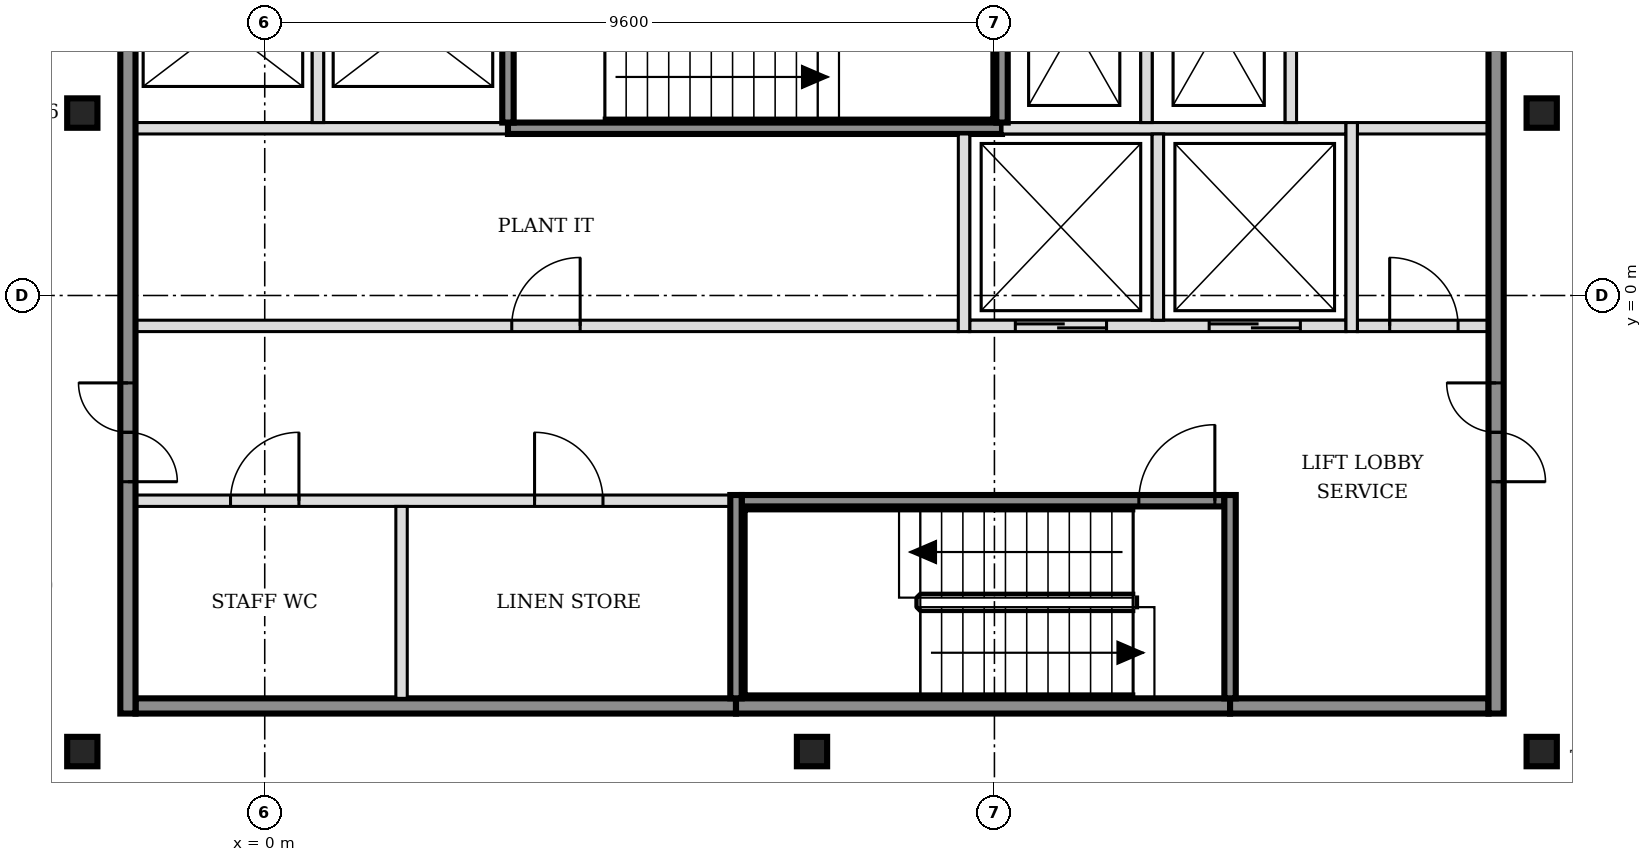
"""IFC4 building model, lengths in metres.
Left out: names, types, materials, properties, quantities, classifications, styles, units other than length and angle.
Written with IfcOpenShell. Run it as: python <this file> out.ifc"""

import sys

from ifc_helpers import new_model, si_unit, direction, frame, frame_2d, origin, origin_2d, place, context, subcontext, project, spatial, rectangle, i_section, extrude, element, fill, save


model = new_model("IFC4")
c1 = context("Model", 3, precision=1e-05, world=origin(), true_north=direction((0.0, 1.0)))
c2 = subcontext(c1, "Body", "Model", "MODEL_VIEW")
j1 = project(units=[si_unit("LENGTHUNIT", "METRE"), si_unit("PLANEANGLEUNIT", "RADIAN")], contexts=[c1])
p1 = place(None, origin())
s1 = spatial("IfcSite", under=j1, at=p1, CompositionType="ELEMENT")
p2 = place(p1, origin())
s2 = spatial("IfcBuilding", under=s1, at=p2, CompositionType="ELEMENT")
p3 = place(p2, frame((0.0, 0.0, 277.8)))
s3 = spatial("IfcBuildingStorey", under=s2, at=p3, CompositionType="ELEMENT", Elevation=277.8)
for number, where, z_axis, x_axis in (
    (1, (-2.4, -6.0, -0.15), (0.0, 0.0, 1.0), (1.0, 0.0, 0.0)),
    (2, (7.2, -6.0, -0.15), (0.0, 0.0, 1.0), (1.0, 0.0, 0.0)),
    (3, (16.8, -6.0, -0.15), (0.0, 0.0, 1.0), (1.0, 0.0, 0.0)),
    (4, (-2.4, 2.4, -0.15), (0.0, 0.0, 1.0), (1.0, 0.0, 0.0)),
    (5, (16.8, 2.4, -0.15), (0.0, 0.0, 1.0), (1.0, 0.0, 0.0)),
):
    element("IfcColumn", number, at=place(p3, frame(where, z_axis=z_axis, x_axis=x_axis)), inside=s3, PredefinedType="COLUMN", context=c2, shape_type="SweptSolid", body=[
        extrude(i_section(OverallWidth=0.398, OverallDepth=0.387, WebThickness=0.021, FlangeThickness=0.033, FilletRadius=0.015, at=origin_2d()), origin(), (0.0, 0.0, 1.0), 3.6),
    ])
p4 = place(p3, frame((-1.7, -5.4, 0.0), z_axis=(0.0, 0.0, 1.0), x_axis=(1.0, 0.0, 0.0)))
e6 = element("IfcWall", 6, at=p4, inside=s3, PredefinedType="SOLIDWALL", context=c2, shape_type="SweptSolid", body=[
    extrude(rectangle(XDim=7.9, YDim=0.2, at=frame_2d((3.95, 0.0))), origin(), (0.0, 0.0, 1.0), 3.45),
])
p5 = place(p3, frame((6.2, -5.4, 0.0), z_axis=(0.0, 0.0, 1.0), x_axis=(1.0, 0.0, 0.0)))
e7 = element("IfcWall", 7, at=p5, inside=s3, PredefinedType="SOLIDWALL", context=c2, shape_type="SweptSolid", body=[
    extrude(rectangle(XDim=6.5, YDim=0.2, at=frame_2d((3.25, 0.0))), origin(), (0.0, 0.0, 1.0), 3.45),
])
p6 = place(p3, frame((12.7, -5.4, 0.0), z_axis=(0.0, 0.0, 1.0), x_axis=(1.0, 0.0, 0.0)))
e8 = element("IfcWall", 8, at=p6, inside=s3, PredefinedType="SOLIDWALL", context=c2, shape_type="SweptSolid", body=[
    extrude(rectangle(XDim=3.4, YDim=0.2, at=frame_2d((1.7, 0.0))), origin(), (0.0, 0.0, 1.0), 3.45),
])
p7 = place(p3, frame((-1.7, -2.7, 0.0), z_axis=(0.0, 0.0, 1.0), x_axis=(1.0, 0.0, 0.0)))
e9 = element("IfcWall", 9, at=p7, inside=s3, PredefinedType="PARTITIONING", context=c2, shape_type="SweptSolid", body=[
    extrude(rectangle(XDim=7.825, YDim=0.15, at=frame_2d((3.913, 0.0))), origin(), (0.0, 0.0, 1.0), 3.45),
])
p8 = place(p7, frame((1.25, 0.0, 0.0)))
e10 = element("IfcOpeningElement", 10, at=p8, cuts=e9, PredefinedType="OPENING", context=c2, shape_type="SweptSolid", body=[
    extrude(rectangle(XDim=0.9, YDim=2.1, at=frame_2d((0.45, 1.05))), frame((0.0, 0.085, 0.0), z_axis=(0.0, -1.0, 0.0), x_axis=(1.0, 0.0, 0.0)), (0.0, 0.0, 1.0), 0.17),
])
p9 = place(p7, frame((5.25, 0.0, 0.0)))
e11 = element("IfcOpeningElement", 11, at=p9, cuts=e9, PredefinedType="OPENING", context=c2, shape_type="SweptSolid", body=[
    extrude(rectangle(XDim=0.9, YDim=2.1, at=frame_2d((0.45, 1.05))), frame((0.0, 0.085, 0.0), z_axis=(0.0, -1.0, 0.0), x_axis=(1.0, 0.0, 0.0)), (0.0, 0.0, 1.0), 0.17),
])
p10 = place(p3, frame((6.275, -2.7, 0.0), z_axis=(0.0, 0.0, 1.0), x_axis=(1.0, 0.0, 0.0)))
e12 = element("IfcWall", 12, at=p10, inside=s3, PredefinedType="SOLIDWALL", context=c2, shape_type="SweptSolid", body=[
    extrude(rectangle(XDim=6.35, YDim=0.15, at=frame_2d((3.175, 0.0))), origin(), (0.0, 0.0, 1.0), 3.45),
])
p11 = place(p10, frame((5.225, 0.0, 0.0)))
e13 = element("IfcOpeningElement", 13, at=p11, cuts=e12, PredefinedType="OPENING", context=c2, shape_type="SweptSolid", body=[
    extrude(rectangle(XDim=1.0, YDim=2.1, at=frame_2d((0.5, 1.05))), frame((0.0, 0.085, 0.0), z_axis=(0.0, -1.0, 0.0), x_axis=(1.0, 0.0, 0.0)), (0.0, 0.0, 1.0), 0.17),
])
p12 = place(p3, frame((-1.7, -0.4, 0.0), z_axis=(0.0, 0.0, 1.0), x_axis=(1.0, 0.0, 0.0)))
e14 = element("IfcWall", 14, at=p12, inside=s3, PredefinedType="PARTITIONING", context=c2, shape_type="SweptSolid", body=[
    extrude(rectangle(XDim=10.825, YDim=0.15, at=frame_2d((5.413, 0.0))), origin(), (0.0, 0.0, 1.0), 3.45),
])
p13 = place(p12, frame((4.95, 0.0, 0.0)))
e15 = element("IfcOpeningElement", 15, at=p13, cuts=e14, PredefinedType="OPENING", context=c2, shape_type="SweptSolid", body=[
    extrude(rectangle(XDim=0.9, YDim=2.1, at=frame_2d((0.45, 1.05))), frame((0.0, 0.085, 0.0), z_axis=(0.0, -1.0, 0.0), x_axis=(1.0, 0.0, 0.0)), (0.0, 0.0, 1.0), 0.17),
])
p14 = place(p3, frame((9.275, -0.4, 0.0), z_axis=(0.0, 0.0, 1.0), x_axis=(1.0, 0.0, 0.0)))
e16 = element("IfcWall", 16, at=p14, inside=s3, PredefinedType="SOLIDWALL", context=c2, shape_type="SweptSolid", body=[
    extrude(rectangle(XDim=4.95, YDim=0.15, at=frame_2d((2.475, 0.0))), origin(), (0.0, 0.0, 1.0), 3.45),
])
p15 = place(p14, frame((0.6, 0.0, 0.0)))
e17 = element("IfcOpeningElement", 17, at=p15, cuts=e16, PredefinedType="OPENING", context=c2, shape_type="SweptSolid", body=[
    extrude(rectangle(XDim=1.2, YDim=2.1, at=frame_2d((0.6, 1.05))), frame((0.0, 0.085, 0.0), z_axis=(0.0, -1.0, 0.0), x_axis=(1.0, 0.0, 0.0)), (0.0, 0.0, 1.0), 0.17),
])
p16 = place(p14, frame((3.15, 0.0, 0.0)))
e18 = element("IfcOpeningElement", 18, at=p16, cuts=e16, PredefinedType="OPENING", context=c2, shape_type="SweptSolid", body=[
    extrude(rectangle(XDim=1.2, YDim=2.1, at=frame_2d((0.6, 1.05))), frame((0.0, 0.085, 0.0), z_axis=(0.0, -1.0, 0.0), x_axis=(1.0, 0.0, 0.0)), (0.0, 0.0, 1.0), 0.17),
])
p17 = place(p3, frame((14.375, -0.4, 0.0), z_axis=(0.0, 0.0, 1.0), x_axis=(1.0, 0.0, 0.0)))
e19 = element("IfcWall", 19, at=p17, inside=s3, PredefinedType="PARTITIONING", context=c2, shape_type="SweptSolid", body=[
    extrude(rectangle(XDim=1.725, YDim=0.15, at=frame_2d((0.863, 0.0))), origin(), (0.0, 0.0, 1.0), 3.45),
])
p18 = place(p17, frame((0.425, 0.0, 0.0)))
e20 = element("IfcOpeningElement", 20, at=p18, cuts=e19, PredefinedType="OPENING", context=c2, shape_type="SweptSolid", body=[
    extrude(rectangle(XDim=0.9, YDim=2.1, at=frame_2d((0.45, 1.05))), frame((0.0, 0.085, 0.0), z_axis=(0.0, -1.0, 0.0), x_axis=(1.0, 0.0, 0.0)), (0.0, 0.0, 1.0), 0.17),
])
p19 = place(p3, frame((-1.7, 2.2, 0.0), z_axis=(0.0, 0.0, 1.0), x_axis=(1.0, 0.0, 0.0)))
e21 = element("IfcWall", 21, at=p19, inside=s3, PredefinedType="SOLIDWALL", context=c2, shape_type="SweptSolid", body=[
    extrude(rectangle(XDim=4.9, YDim=0.15, at=frame_2d((2.45, 0.0))), origin(), (0.0, 0.0, 1.0), 3.45),
])
p20 = place(p3, frame((3.2, 2.2, 0.0), z_axis=(0.0, 0.0, 1.0), x_axis=(1.0, 0.0, 0.0)))
e22 = element("IfcWall", 22, at=p20, inside=s3, PredefinedType="SOLIDWALL", context=c2, shape_type="SweptSolid", body=[
    extrude(rectangle(XDim=6.5, YDim=0.15, at=frame_2d((3.25, 0.0))), origin(), (0.0, 0.0, 1.0), 3.45),
])
p21 = place(p3, frame((9.7, 2.2, 0.0), z_axis=(0.0, 0.0, 1.0), x_axis=(1.0, 0.0, 0.0)))
e23 = element("IfcWall", 23, at=p21, inside=s3, PredefinedType="SOLIDWALL", context=c2, shape_type="SweptSolid", body=[
    extrude(rectangle(XDim=4.525, YDim=0.15, at=frame_2d((2.263, 0.0))), origin(), (0.0, 0.0, 1.0), 3.45),
])
p22 = place(p3, frame((14.375, 2.2, 0.0), z_axis=(0.0, 0.0, 1.0), x_axis=(1.0, 0.0, 0.0)))
e24 = element("IfcWall", 24, at=p22, inside=s3, PredefinedType="PARTITIONING", context=c2, shape_type="SweptSolid", body=[
    extrude(rectangle(XDim=1.725, YDim=0.15, at=frame_2d((0.863, 0.0))), origin(), (0.0, 0.0, 1.0), 3.45),
])
p23 = place(p3, frame((-1.8, -5.5, 0.0), z_axis=(0.0, 0.0, 1.0), x_axis=(0.0, 1.0, 0.0)))
e25 = element("IfcWall", 25, at=p23, inside=s3, PredefinedType="SOLIDWALL", context=c2, shape_type="SweptSolid", body=[
    extrude(rectangle(XDim=15.8, YDim=0.2, at=frame_2d((7.9, 0.0))), origin(), (0.0, 0.0, 1.0), 3.45),
])
p24 = place(p23, frame((3.05, 0.0, 0.0)))
e26 = element("IfcOpeningElement", 26, at=p24, cuts=e25, PredefinedType="OPENING", context=c2, shape_type="SweptSolid", body=[
    extrude(rectangle(XDim=1.3, YDim=2.1, at=frame_2d((0.65, 1.05))), frame((0.0, 0.11, 0.0), z_axis=(0.0, -1.0, 0.0), x_axis=(1.0, 0.0, 0.0)), (0.0, 0.0, 1.0), 0.22),
])
p25 = place(p23, frame((11.45, 0.0, 0.0)))
e27 = element("IfcOpeningElement", 27, at=p25, cuts=e25, PredefinedType="OPENING", context=c2, shape_type="SweptSolid", body=[
    extrude(rectangle(XDim=1.3, YDim=2.1, at=frame_2d((0.65, 1.05))), frame((0.0, 0.11, 0.0), z_axis=(0.0, -1.0, 0.0), x_axis=(1.0, 0.0, 0.0)), (0.0, 0.0, 1.0), 0.22),
])
p26 = place(p3, frame((0.7, 2.275, 0.0), z_axis=(0.0, 0.0, 1.0), x_axis=(0.0, 1.0, 0.0)))
e28 = element("IfcWall", 28, at=p26, inside=s3, PredefinedType="SOLIDWALL", context=c2, shape_type="SweptSolid", body=[
    extrude(rectangle(XDim=2.55, YDim=0.15, at=frame_2d((1.275, 0.0))), origin(), (0.0, 0.0, 1.0), 3.45),
])
p27 = place(p3, frame((1.8, -5.3, 0.0), z_axis=(0.0, 0.0, 1.0), x_axis=(0.0, 1.0, 0.0)))
e29 = element("IfcWall", 29, at=p27, inside=s3, PredefinedType="PARTITIONING", context=c2, shape_type="SweptSolid", body=[
    extrude(rectangle(XDim=2.525, YDim=0.15, at=frame_2d((1.263, 0.0))), origin(), (0.0, 0.0, 1.0), 3.45),
])
p28 = place(p3, frame((3.2, 2.275, 0.0), z_axis=(0.0, 0.0, 1.0), x_axis=(0.0, 1.0, 0.0)))
e30 = element("IfcWall", 30, at=p28, inside=s3, PredefinedType="SOLIDWALL", context=c2, shape_type="SweptSolid", body=[
    extrude(rectangle(XDim=2.55, YDim=0.15, at=frame_2d((1.275, 0.0))), origin(), (0.0, 0.0, 1.0), 3.45),
])
p29 = place(p3, frame((6.2, -5.3, 0.0), z_axis=(0.0, 0.0, 1.0), x_axis=(0.0, 1.0, 0.0)))
e31 = element("IfcWall", 31, at=p29, inside=s3, PredefinedType="SOLIDWALL", context=c2, shape_type="SweptSolid", body=[
    extrude(rectangle(XDim=2.675, YDim=0.15, at=frame_2d((1.337, 0.0))), origin(), (0.0, 0.0, 1.0), 3.45),
])
p30 = place(p3, frame((9.2, -0.475, 0.0), z_axis=(0.0, 0.0, 1.0), x_axis=(0.0, 1.0, 0.0)))
e32 = element("IfcWall", 32, at=p30, inside=s3, PredefinedType="SOLIDWALL", context=c2, shape_type="SweptSolid", body=[
    extrude(rectangle(XDim=2.6, YDim=0.15, at=frame_2d((1.3, 0.0))), origin(), (0.0, 0.0, 1.0), 3.45),
])
for number, where, z_axis, x_axis in (
    (33, (9.7, 2.275, 0.0), (0.0, 0.0, 1.0), (0.0, 1.0, 0.0)),
    (34, (11.6, 2.275, 0.0), (0.0, 0.0, 1.0), (0.0, 1.0, 0.0)),
):
    element("IfcWall", number, at=place(p3, frame(where, z_axis=z_axis, x_axis=x_axis)), inside=s3, PredefinedType="SOLIDWALL", context=c2, shape_type="SweptSolid", body=[
        extrude(rectangle(XDim=2.55, YDim=0.15, at=frame_2d((1.275, 0.0))), origin(), (0.0, 0.0, 1.0), 3.45),
    ])
p31 = place(p3, frame((11.75, -0.325, 0.0), z_axis=(0.0, 0.0, 1.0), x_axis=(0.0, 1.0, 0.0)))
e35 = element("IfcWall", 35, at=p31, inside=s3, PredefinedType="SOLIDWALL", context=c2, shape_type="SweptSolid", body=[
    extrude(rectangle(XDim=2.45, YDim=0.15, at=frame_2d((1.225, 0.0))), origin(), (0.0, 0.0, 1.0), 3.45),
])
p32 = place(p3, frame((12.7, -5.3, 0.0), z_axis=(0.0, 0.0, 1.0), x_axis=(0.0, 1.0, 0.0)))
e36 = element("IfcWall", 36, at=p32, inside=s3, PredefinedType="SOLIDWALL", context=c2, shape_type="SweptSolid", body=[
    extrude(rectangle(XDim=2.675, YDim=0.15, at=frame_2d((1.337, 0.0))), origin(), (0.0, 0.0, 1.0), 3.45),
])
p33 = place(p3, frame((13.5, 2.275, 0.0), z_axis=(0.0, 0.0, 1.0), x_axis=(0.0, 1.0, 0.0)))
e37 = element("IfcWall", 37, at=p33, inside=s3, PredefinedType="SOLIDWALL", context=c2, shape_type="SweptSolid", body=[
    extrude(rectangle(XDim=2.55, YDim=0.15, at=frame_2d((1.275, 0.0))), origin(), (0.0, 0.0, 1.0), 3.45),
])
p34 = place(p3, frame((14.3, -0.475, 0.0), z_axis=(0.0, 0.0, 1.0), x_axis=(0.0, 1.0, 0.0)))
e38 = element("IfcWall", 38, at=p34, inside=s3, PredefinedType="SOLIDWALL", context=c2, shape_type="SweptSolid", body=[
    extrude(rectangle(XDim=2.75, YDim=0.15, at=frame_2d((1.375, 0.0))), origin(), (0.0, 0.0, 1.0), 3.45),
])
p35 = place(p3, frame((16.2, -5.5, 0.0), z_axis=(0.0, 0.0, 1.0), x_axis=(0.0, 1.0, 0.0)))
e39 = element("IfcWall", 39, at=p35, inside=s3, PredefinedType="SOLIDWALL", context=c2, shape_type="SweptSolid", body=[
    extrude(rectangle(XDim=15.8, YDim=0.2, at=frame_2d((7.9, 0.0))), origin(), (0.0, 0.0, 1.0), 3.45),
])
p36 = place(p35, frame((3.05, 0.0, 0.0)))
e40 = element("IfcOpeningElement", 40, at=p36, cuts=e39, PredefinedType="OPENING", context=c2, shape_type="SweptSolid", body=[
    extrude(rectangle(XDim=1.3, YDim=2.1, at=frame_2d((0.65, 1.05))), frame((0.0, 0.11, 0.0), z_axis=(0.0, -1.0, 0.0), x_axis=(1.0, 0.0, 0.0)), (0.0, 0.0, 1.0), 0.22),
])
p37 = place(p35, frame((11.45, 0.0, 0.0)))
e41 = element("IfcOpeningElement", 41, at=p37, cuts=e39, PredefinedType="OPENING", context=c2, shape_type="SweptSolid", body=[
    extrude(rectangle(XDim=1.3, YDim=2.1, at=frame_2d((0.65, 1.05))), frame((0.0, 0.11, 0.0), z_axis=(0.0, -1.0, 0.0), x_axis=(1.0, 0.0, 0.0)), (0.0, 0.0, 1.0), 0.22),
])
p38 = place(p3, frame((13.122, -17.872, 0.0), z_axis=(0.0, 0.0, 1.0), x_axis=(0.707101927234, 0.707111635106, 0.0)))
e42 = element("IfcWall", 42, at=p38, inside=s3, PredefinedType="PARTITIONING", context=c2, shape_type="SweptSolid", body=[
    extrude(rectangle(XDim=25.149, YDim=0.15, at=frame_2d((12.574, 0.0))), origin(), (0.0, 0.0, 1.0), 2.73),
])
p39 = place(p38, frame((4.672, 0.0, 0.0)))
e43 = element("IfcOpeningElement", 43, at=p39, cuts=e42, PredefinedType="OPENING", context=c2, shape_type="SweptSolid", body=[
    extrude(rectangle(XDim=0.9, YDim=2.1, at=frame_2d((0.45, 1.05))), frame((0.0, 0.085, 0.0), z_axis=(0.0, -1.0, 0.0), x_axis=(1.0, 0.0, 0.0)), (0.0, 0.0, 1.0), 0.17),
])
p40 = place(p38, frame((14.284, 0.0, 0.0)))
e44 = element("IfcOpeningElement", 44, at=p40, cuts=e42, PredefinedType="OPENING", context=c2, shape_type="SweptSolid", body=[
    extrude(rectangle(XDim=0.9, YDim=2.1, at=frame_2d((0.45, 1.05))), frame((0.0, 0.085, 0.0), z_axis=(0.0, -1.0, 0.0), x_axis=(1.0, 0.0, 0.0)), (0.0, 0.0, 1.0), 0.17),
])
p41 = place(p38, frame((22.704, 0.0, 0.0)))
e45 = element("IfcOpeningElement", 45, at=p41, cuts=e42, PredefinedType="OPENING", context=c2, shape_type="SweptSolid", body=[
    extrude(rectangle(XDim=0.9, YDim=2.1, at=frame_2d((0.45, 1.05))), frame((0.0, 0.085, 0.0), z_axis=(0.0, -1.0, 0.0), x_axis=(1.0, 0.0, 0.0)), (0.0, 0.0, 1.0), 0.17),
])
p42 = place(p15, origin())
e46 = element("IfcDoor", 46, at=p42, inside=s3, OperationType="DOUBLE_DOOR_SLIDING", PredefinedType="DOOR", context=c2, shape_type="SweptSolid", body=[
    extrude(rectangle(XDim=1.2, YDim=2.1, at=frame_2d((0.6, 1.05))), frame((0.0, 0.025, 0.0), z_axis=(0.0, -1.0, 0.0), x_axis=(1.0, 0.0, 0.0)), (0.0, 0.0, 1.0), 0.05),
])
fill(e17, e46)
p43 = place(p16, origin())
e47 = element("IfcDoor", 47, at=p43, inside=s3, OperationType="DOUBLE_DOOR_SLIDING", PredefinedType="DOOR", context=c2, shape_type="SweptSolid", body=[
    extrude(rectangle(XDim=1.2, YDim=2.1, at=frame_2d((0.6, 1.05))), frame((0.0, 0.025, 0.0), z_axis=(0.0, -1.0, 0.0), x_axis=(1.0, 0.0, 0.0)), (0.0, 0.0, 1.0), 0.05),
])
fill(e18, e47)
p44 = place(p11, origin())
e48 = element("IfcDoor", 48, at=p44, inside=s3, OperationType="SINGLE_SWING_RIGHT", PredefinedType="DOOR", context=c2, shape_type="SweptSolid", body=[
    extrude(rectangle(XDim=1.0, YDim=2.1, at=frame_2d((0.5, 1.05))), frame((0.0, 0.025, 0.0), z_axis=(0.0, -1.0, 0.0), x_axis=(1.0, 0.0, 0.0)), (0.0, 0.0, 1.0), 0.05),
])
fill(e13, e48)
p45 = place(p24, origin())
e49 = element("IfcDoor", 49, at=p45, inside=s3, OperationType="DOUBLE_DOOR_SINGLE_SWING", PredefinedType="DOOR", context=c2, shape_type="SweptSolid", body=[
    extrude(rectangle(XDim=1.3, YDim=2.1, at=frame_2d((0.65, 1.05))), frame((0.0, 0.025, 0.0), z_axis=(0.0, -1.0, 0.0), x_axis=(1.0, 0.0, 0.0)), (0.0, 0.0, 1.0), 0.05),
])
fill(e26, e49)
p46 = place(p36, origin())
e50 = element("IfcDoor", 50, at=p46, inside=s3, OperationType="DOUBLE_DOOR_SINGLE_SWING", PredefinedType="DOOR", context=c2, shape_type="SweptSolid", body=[
    extrude(rectangle(XDim=1.3, YDim=2.1, at=frame_2d((0.65, 1.05))), frame((0.0, 0.025, 0.0), z_axis=(0.0, -1.0, 0.0), x_axis=(1.0, 0.0, 0.0)), (0.0, 0.0, 1.0), 0.05),
])
fill(e40, e50)
p47 = place(p18, origin())
e51 = element("IfcDoor", 51, at=p47, inside=s3, OperationType="SINGLE_SWING_LEFT", PredefinedType="DOOR", context=c2, shape_type="SweptSolid", body=[
    extrude(rectangle(XDim=0.9, YDim=2.1, at=frame_2d((0.45, 1.05))), frame((0.0, 0.025, 0.0), z_axis=(0.0, -1.0, 0.0), x_axis=(1.0, 0.0, 0.0)), (0.0, 0.0, 1.0), 0.05),
])
fill(e20, e51)
p48 = place(p8, origin())
e52 = element("IfcDoor", 52, at=p48, inside=s3, OperationType="SINGLE_SWING_RIGHT", PredefinedType="DOOR", context=c2, shape_type="SweptSolid", body=[
    extrude(rectangle(XDim=0.9, YDim=2.1, at=frame_2d((0.45, 1.05))), frame((0.0, 0.025, 0.0), z_axis=(0.0, -1.0, 0.0), x_axis=(1.0, 0.0, 0.0)), (0.0, 0.0, 1.0), 0.05),
])
fill(e10, e52)
p49 = place(p9, origin())
e53 = element("IfcDoor", 53, at=p49, inside=s3, OperationType="SINGLE_SWING_LEFT", PredefinedType="DOOR", context=c2, shape_type="SweptSolid", body=[
    extrude(rectangle(XDim=0.9, YDim=2.1, at=frame_2d((0.45, 1.05))), frame((0.0, 0.025, 0.0), z_axis=(0.0, -1.0, 0.0), x_axis=(1.0, 0.0, 0.0)), (0.0, 0.0, 1.0), 0.05),
])
fill(e11, e53)
p50 = place(p13, origin())
e54 = element("IfcDoor", 54, at=p50, inside=s3, OperationType="SINGLE_SWING_RIGHT", PredefinedType="DOOR", context=c2, shape_type="SweptSolid", body=[
    extrude(rectangle(XDim=0.9, YDim=2.1, at=frame_2d((0.45, 1.05))), frame((0.0, 0.025, 0.0), z_axis=(0.0, -1.0, 0.0), x_axis=(1.0, 0.0, 0.0)), (0.0, 0.0, 1.0), 0.05),
])
fill(e15, e54)
save(model, sys.argv[1])
